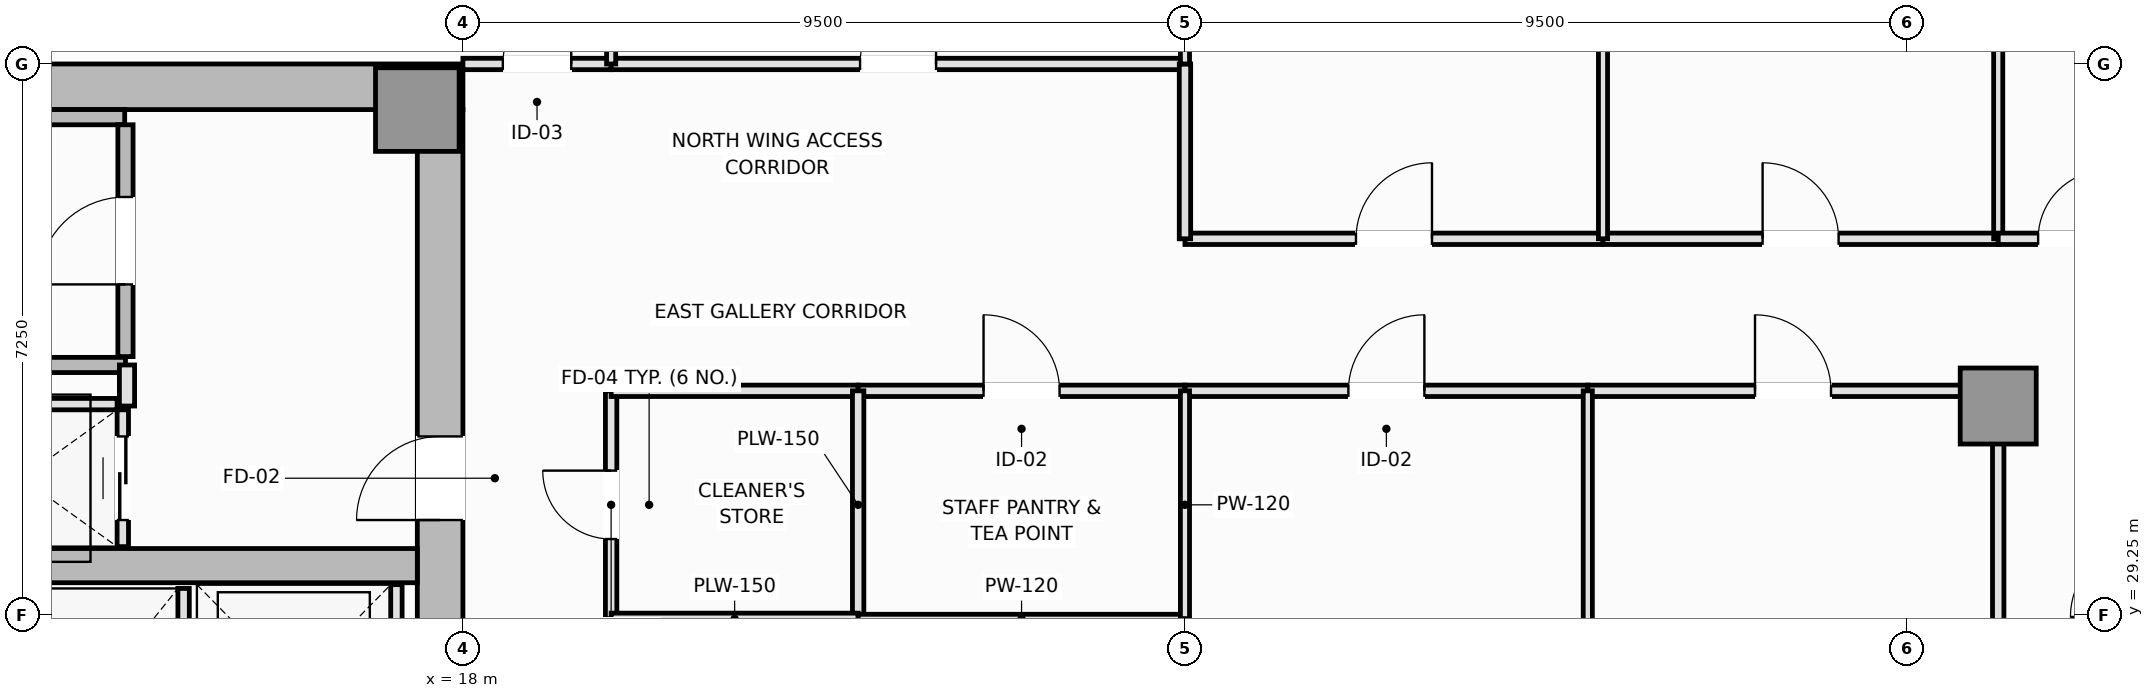
"""IFC4 building model, lengths in metres.
Left out: names, types, materials, properties, quantities, classifications, styles, units other than length and angle.
Written with IfcOpenShell. Run it as: python <this file> out.ifc"""

import sys

from ifc_helpers import new_model, si_unit, direction, frame, frame_2d, origin, origin_2d, place, context, subcontext, project, spatial, rectangle, extrude, element, fill, save


model = new_model("IFC4")
c1 = context("Model", 3, precision=1e-05, world=origin(), true_north=direction((0.0, 1.0)))
c2 = subcontext(c1, "Body", "Model", "MODEL_VIEW")
j1 = project(units=[si_unit("LENGTHUNIT", "METRE"), si_unit("PLANEANGLEUNIT", "RADIAN")], contexts=[c1])
p1 = place(None, origin())
s1 = spatial("IfcSite", under=j1, at=p1, CompositionType="ELEMENT")
p2 = place(p1, origin())
s2 = spatial("IfcBuilding", under=s1, at=p2, CompositionType="ELEMENT")
p3 = place(p2, frame((0.0, 0.0, 116.45)))
s3 = spatial("IfcBuildingStorey", under=s2, at=p3, CompositionType="ELEMENT", Elevation=116.45)
p4 = place(p3, frame((4.5, 36.2, 0.0), z_axis=(0.0, 0.0, 1.0), x_axis=(1.0, 0.0, 0.0)))
e1 = element("IfcWall", 1, at=p4, inside=s3, PredefinedType="SHEAR", context=c2, shape_type="SweptSolid", body=[
    extrude(rectangle(XDim=13.5, YDim=0.6, at=frame_2d((6.75, 0.0))), origin(), (0.0, 0.0, 1.0), 3.55),
])
p5 = place(p3, frame((17.7, 27.05, 0.0), z_axis=(0.0, 0.0, 1.0), x_axis=(0.0, 1.0, 0.0)))
e2 = element("IfcWall", 2, at=p5, inside=s3, PredefinedType="SHEAR", context=c2, shape_type="SweptSolid", body=[
    extrude(rectangle(XDim=8.85, YDim=0.6, at=frame_2d((4.425, 0.0))), origin(), (0.0, 0.0, 1.0), 3.55),
])
p6 = place(p5, frame((3.45, 0.0, 0.0)))
e3 = element("IfcOpeningElement", 3, at=p6, cuts=e2, PredefinedType="OPENING", context=c2, shape_type="SweptSolid", body=[
    extrude(rectangle(XDim=1.1, YDim=2.15, at=frame_2d((0.55, 1.075))), frame((0.0, 0.31, 0.0), z_axis=(0.0, -1.0, 0.0), x_axis=(1.0, 0.0, 0.0)), (0.0, 0.0, 1.0), 0.62),
])
p7 = place(p3, frame((5.1, 29.9, 0.0), z_axis=(0.0, 0.0, 1.0), x_axis=(1.0, 0.0, 0.0)))
e4 = element("IfcWall", 4, at=p7, inside=s3, PredefinedType="SHEAR", context=c2, shape_type="SweptSolid", body=[
    extrude(rectangle(XDim=12.3, YDim=0.45, at=frame_2d((6.15, 0.0))), origin(), (0.0, 0.0, 1.0), 3.55),
])
p8 = place(p3, frame((17.4, 35.9, 0.0), z_axis=(0.0, 0.0, 1.0), x_axis=(1.0, 0.0, 0.0)))
e5 = element("IfcColumn", 5, at=p8, inside=s3, PredefinedType="PILASTER", context=c2, shape_type="SweptSolid", body=[
    extrude(rectangle(XDim=1.1, YDim=1.1, at=origin_2d()), origin(), (0.0, 0.0, 1.0), 3.55),
])
p9 = place(p3, frame((38.2, 32.0, 0.0), z_axis=(0.0, 0.0, 1.0), x_axis=(1.0, 0.0, 0.0)))
e6 = element("IfcColumn", 6, at=p9, inside=s3, PredefinedType="COLUMN", context=c2, shape_type="SweptSolid", body=[
    extrude(rectangle(XDim=1.0, YDim=1.0, at=origin_2d()), origin(), (0.0, 0.0, 1.0), 3.55),
])
p10 = place(p3, frame((5.8, 35.8, 0.0), z_axis=(0.0, 0.0, 1.0), x_axis=(1.0, 0.0, 0.0)))
e7 = element("IfcWall", 7, at=p10, inside=s3, PredefinedType="SOLIDWALL", context=c2, shape_type="SweptSolid", body=[
    extrude(rectangle(XDim=7.75, YDim=0.2, at=frame_2d((3.875, 0.0))), origin(), (0.0, 0.0, 1.0), 3.55),
])
p11 = place(p3, frame((5.9, 32.54, 0.0), z_axis=(0.0, 0.0, 1.0), x_axis=(1.0, 0.0, 0.0)))
e8 = element("IfcWall", 8, at=p11, inside=s3, PredefinedType="SOLIDWALL", context=c2, shape_type="SweptSolid", body=[
    extrude(rectangle(XDim=7.66, YDim=0.2, at=frame_2d((3.83, 0.0))), origin(), (0.0, 0.0, 1.0), 3.55),
])
p12 = place(p3, frame((13.56, 32.65, 0.0), z_axis=(0.0, 0.0, 1.0), x_axis=(0.0, 1.0, 0.0)))
e9 = element("IfcWall", 9, at=p12, inside=s3, PredefinedType="SOLIDWALL", context=c2, shape_type="SweptSolid", body=[
    extrude(rectangle(XDim=3.05, YDim=0.2, at=frame_2d((1.525, 0.0))), origin(), (0.0, 0.0, 1.0), 3.55),
])
p13 = place(p12, frame((0.95, 0.0, 0.0)))
e10 = element("IfcOpeningElement", 10, at=p13, cuts=e9, PredefinedType="OPENING", context=c2, shape_type="SweptSolid", body=[
    extrude(rectangle(XDim=1.15, YDim=2.15, at=frame_2d((0.575, 1.075))), frame((0.0, 0.11, 0.0), z_axis=(0.0, -1.0, 0.0), x_axis=(1.0, 0.0, 0.0)), (0.0, 0.0, 1.0), 0.22),
])
p14 = place(p3, frame((14.325, 27.05, 0.0), z_axis=(0.0, 0.0, 1.0), x_axis=(0.0, 1.0, 0.0)))
e11 = element("IfcWall", 11, at=p14, inside=s3, PredefinedType="PARTITIONING", context=c2, shape_type="SweptSolid", body=[
    extrude(rectangle(XDim=2.55, YDim=0.15, at=frame_2d((1.275, 0.0))), origin(), (0.0, 0.0, 1.0), 3.37),
])
p15 = place(p3, frame((17.125, 27.05, 0.0), z_axis=(0.0, 0.0, 1.0), x_axis=(0.0, 1.0, 0.0)))
e12 = element("IfcWall", 12, at=p15, inside=s3, PredefinedType="PARTITIONING", context=c2, shape_type="SweptSolid", body=[
    extrude(rectangle(XDim=2.6, YDim=0.15, at=frame_2d((1.3, 0.0))), origin(), (0.0, 0.0, 1.0), 3.37),
])
p16 = place(p3, frame((10.95, 32.025, 0.0), z_axis=(0.0, 0.0, 1.0), x_axis=(1.0, 0.0, 0.0)))
e13 = element("IfcWall", 13, at=p16, inside=s3, PredefinedType="PARTITIONING", context=c2, shape_type="SweptSolid", body=[
    extrude(rectangle(XDim=2.5, YDim=0.15, at=frame_2d((1.25, 0.0))), origin(), (0.0, 0.0, 1.0), 3.37),
])
p17 = place(p3, frame((13.525, 30.15, 0.0), z_axis=(0.0, 0.0, 1.0), x_axis=(0.0, 1.0, 0.0)))
e14 = element("IfcWall", 14, at=p17, inside=s3, PredefinedType="PARTITIONING", context=c2, shape_type="SweptSolid", body=[
    extrude(rectangle(XDim=1.8, YDim=0.15, at=frame_2d((0.9, 0.0))), origin(), (0.0, 0.0, 1.0), 3.37),
])
p18 = place(p17, frame((0.35, 0.0, 0.0)))
e15 = element("IfcOpeningElement", 15, at=p18, cuts=e14, PredefinedType="OPENING", context=c2, shape_type="SweptSolid", body=[
    extrude(rectangle(XDim=1.1, YDim=2.2, at=frame_2d((0.55, 1.1))), frame((0.0, 0.085, 0.0), z_axis=(0.0, -1.0, 0.0), x_axis=(1.0, 0.0, 0.0)), (0.0, 0.0, 1.0), 0.17),
])
p19 = place(p3, frame((13.58, 32.0, 0.0), z_axis=(0.0, 0.0, 1.0), x_axis=(0.0, 1.0, 0.0)))
e16 = element("IfcWall", 16, at=p19, inside=s3, PredefinedType="PARTITIONING", context=c2, shape_type="SweptSolid", body=[
    extrude(rectangle(XDim=0.54, YDim=0.2, at=frame_2d((0.27, 0.0))), origin(), (0.0, 0.0, 1.0), 3.37),
])
p20 = place(p3, frame((19.95, 29.2, 0.0), z_axis=(0.0, 0.0, 1.0), x_axis=(0.0, 1.0, 0.0)))
e17 = element("IfcWall", 17, at=p20, inside=s3, PredefinedType="PLUMBINGWALL", context=c2, shape_type="SweptSolid", body=[
    extrude(rectangle(XDim=3.0, YDim=0.15, at=frame_2d((1.5, 0.0))), origin(), (0.0, 0.0, 1.0), 3.37),
])
p21 = place(p20, frame((1.05, 0.0, 0.0)))
e18 = element("IfcOpeningElement", 18, at=p21, cuts=e17, PredefinedType="OPENING", context=c2, shape_type="SweptSolid", body=[
    extrude(rectangle(XDim=0.9, YDim=2.1, at=frame_2d((0.45, 1.05))), frame((0.0, 0.085, 0.0), z_axis=(0.0, -1.0, 0.0), x_axis=(1.0, 0.0, 0.0)), (0.0, 0.0, 1.0), 0.17),
])
p22 = place(p3, frame((18.0, 36.5, 0.0), z_axis=(0.0, 0.0, 1.0), x_axis=(1.0, 0.0, 0.0)))
e19 = element("IfcWall", 19, at=p22, inside=s3, PredefinedType="PARTITIONING", context=c2, shape_type="SweptSolid", body=[
    extrude(rectangle(XDim=1.95, YDim=0.15, at=frame_2d((0.975, 0.0))), origin(), (0.0, 0.0, 1.0), 3.37),
])
p23 = place(p22, frame((0.525, 0.0, 0.0)))
e20 = element("IfcOpeningElement", 20, at=p23, cuts=e19, PredefinedType="OPENING", context=c2, shape_type="SweptSolid", body=[
    extrude(rectangle(XDim=0.9, YDim=2.1, at=frame_2d((0.45, 1.05))), frame((0.0, 0.085, 0.0), z_axis=(0.0, -1.0, 0.0), x_axis=(1.0, 0.0, 0.0)), (0.0, 0.0, 1.0), 0.17),
])
p24 = place(p3, frame((19.95, 32.2, 0.0), z_axis=(0.0, 0.0, 1.0), x_axis=(1.0, 0.0, 0.0)))
e21 = element("IfcWall", 21, at=p24, inside=s3, PredefinedType="PLUMBINGWALL", context=c2, shape_type="SweptSolid", body=[
    extrude(rectangle(XDim=3.25, YDim=0.15, at=frame_2d((1.625, 0.0))), origin(), (0.0, 0.0, 1.0), 3.37),
])
p25 = place(p3, frame((23.2, 32.2, 0.0), z_axis=(0.0, 0.0, 1.0), x_axis=(1.0, 0.0, 0.0)))
e22 = element("IfcWall", 22, at=p25, inside=s3, PredefinedType="PARTITIONING", context=c2, shape_type="SweptSolid", body=[
    extrude(rectangle(XDim=4.3, YDim=0.15, at=frame_2d((2.15, 0.0))), origin(), (0.0, 0.0, 1.0), 3.37),
])
p26 = place(p25, frame((1.65, 0.0, 0.0)))
e23 = element("IfcOpeningElement", 23, at=p26, cuts=e22, PredefinedType="OPENING", context=c2, shape_type="SweptSolid", body=[
    extrude(rectangle(XDim=1.0, YDim=2.15, at=frame_2d((0.5, 1.075))), frame((0.0, 0.085, 0.0), z_axis=(0.0, -1.0, 0.0), x_axis=(1.0, 0.0, 0.0)), (0.0, 0.0, 1.0), 0.17),
])
p27 = place(p3, frame((27.5, 32.2, 0.0), z_axis=(0.0, 0.0, 1.0), x_axis=(1.0, 0.0, 0.0)))
e24 = element("IfcWall", 24, at=p27, inside=s3, PredefinedType="PARTITIONING", context=c2, shape_type="SweptSolid", body=[
    extrude(rectangle(XDim=5.3, YDim=0.15, at=frame_2d((2.65, 0.0))), origin(), (0.0, 0.0, 1.0), 3.37),
])
p28 = place(p27, frame((2.15, 0.0, 0.0)))
e25 = element("IfcOpeningElement", 25, at=p28, cuts=e24, PredefinedType="OPENING", context=c2, shape_type="SweptSolid", body=[
    extrude(rectangle(XDim=1.0, YDim=2.15, at=frame_2d((0.5, 1.075))), frame((0.0, 0.085, 0.0), z_axis=(0.0, -1.0, 0.0), x_axis=(1.0, 0.0, 0.0)), (0.0, 0.0, 1.0), 0.17),
])
p29 = place(p3, frame((32.8, 32.2, 0.0), z_axis=(0.0, 0.0, 1.0), x_axis=(1.0, 0.0, 0.0)))
e26 = element("IfcWall", 26, at=p29, inside=s3, PredefinedType="PARTITIONING", context=c2, shape_type="SweptSolid", body=[
    extrude(rectangle(XDim=5.4, YDim=0.15, at=frame_2d((2.7, 0.0))), origin(), (0.0, 0.0, 1.0), 3.37),
])
p30 = place(p29, frame((2.2, 0.0, 0.0)))
e27 = element("IfcOpeningElement", 27, at=p30, cuts=e26, PredefinedType="OPENING", context=c2, shape_type="SweptSolid", body=[
    extrude(rectangle(XDim=1.0, YDim=2.15, at=frame_2d((0.5, 1.075))), frame((0.0, 0.085, 0.0), z_axis=(0.0, -1.0, 0.0), x_axis=(1.0, 0.0, 0.0)), (0.0, 0.0, 1.0), 0.17),
])
p31 = place(p3, frame((27.5, 34.2, 0.0), z_axis=(0.0, 0.0, 1.0), x_axis=(1.0, 0.0, 0.0)))
e28 = element("IfcWall", 28, at=p31, inside=s3, PredefinedType="PARTITIONING", context=c2, shape_type="SweptSolid", body=[
    extrude(rectangle(XDim=5.5, YDim=0.15, at=frame_2d((2.75, 0.0))), origin(), (0.0, 0.0, 1.0), 3.37),
])
p32 = place(p31, frame((2.25, 0.0, 0.0)))
e29 = element("IfcOpeningElement", 29, at=p32, cuts=e28, PredefinedType="OPENING", context=c2, shape_type="SweptSolid", body=[
    extrude(rectangle(XDim=1.0, YDim=2.15, at=frame_2d((0.5, 1.075))), frame((0.0, 0.085, 0.0), z_axis=(0.0, -1.0, 0.0), x_axis=(1.0, 0.0, 0.0)), (0.0, 0.0, 1.0), 0.17),
])
p33 = place(p3, frame((33.0, 34.2, 0.0), z_axis=(0.0, 0.0, 1.0), x_axis=(1.0, 0.0, 0.0)))
e30 = element("IfcWall", 30, at=p33, inside=s3, PredefinedType="PARTITIONING", context=c2, shape_type="SweptSolid", body=[
    extrude(rectangle(XDim=5.2, YDim=0.15, at=frame_2d((2.6, 0.0))), origin(), (0.0, 0.0, 1.0), 3.37),
])
p34 = place(p33, frame((2.1, 0.0, 0.0)))
e31 = element("IfcOpeningElement", 31, at=p34, cuts=e30, PredefinedType="OPENING", context=c2, shape_type="SweptSolid", body=[
    extrude(rectangle(XDim=1.0, YDim=2.15, at=frame_2d((0.5, 1.075))), frame((0.0, 0.085, 0.0), z_axis=(0.0, -1.0, 0.0), x_axis=(1.0, 0.0, 0.0)), (0.0, 0.0, 1.0), 0.17),
])
p35 = place(p3, frame((19.95, 36.5, 0.0), z_axis=(0.0, 0.0, 1.0), x_axis=(1.0, 0.0, 0.0)))
e32 = element("IfcWall", 32, at=p35, inside=s3, PredefinedType="PARTITIONING", context=c2, shape_type="SweptSolid", body=[
    extrude(rectangle(XDim=7.55, YDim=0.15, at=frame_2d((3.775, 0.0))), origin(), (0.0, 0.0, 1.0), 3.37),
])
p36 = place(p35, frame((3.275, 0.0, 0.0)))
e33 = element("IfcOpeningElement", 33, at=p36, cuts=e32, PredefinedType="OPENING", context=c2, shape_type="SweptSolid", body=[
    extrude(rectangle(XDim=1.0, YDim=2.15, at=frame_2d((0.5, 1.075))), frame((0.0, 0.085, 0.0), z_axis=(0.0, -1.0, 0.0), x_axis=(1.0, 0.0, 0.0)), (0.0, 0.0, 1.0), 0.17),
])
p37 = place(p3, frame((27.5, 34.2, 0.0), z_axis=(0.0, 0.0, 1.0), x_axis=(0.0, 1.0, 0.0)))
e34 = element("IfcWall", 34, at=p37, inside=s3, PredefinedType="PARTITIONING", context=c2, shape_type="SweptSolid", body=[
    extrude(rectangle(XDim=2.3, YDim=0.15, at=frame_2d((1.15, 0.0))), origin(), (0.0, 0.0, 1.0), 3.37),
])
p38 = place(p3, frame((23.2, 29.2, 0.0), z_axis=(0.0, 0.0, 1.0), x_axis=(0.0, 1.0, 0.0)))
e35 = element("IfcWall", 35, at=p38, inside=s3, PredefinedType="PLUMBINGWALL", context=c2, shape_type="SweptSolid", body=[
    extrude(rectangle(XDim=3.0, YDim=0.15, at=frame_2d((1.5, 0.0))), origin(), (0.0, 0.0, 1.0), 3.37),
])
p39 = place(p3, frame((19.95, 29.2, 0.0), z_axis=(0.0, 0.0, 1.0), x_axis=(1.0, 0.0, 0.0)))
e36 = element("IfcWall", 36, at=p39, inside=s3, PredefinedType="PLUMBINGWALL", context=c2, shape_type="SweptSolid", body=[
    extrude(rectangle(XDim=3.25, YDim=0.15, at=frame_2d((1.625, 0.0))), origin(), (0.0, 0.0, 1.0), 3.37),
])
p40 = place(p3, frame((23.2, 29.2, 0.0), z_axis=(0.0, 0.0, 1.0), x_axis=(1.0, 0.0, 0.0)))
e37 = element("IfcWall", 37, at=p40, inside=s3, PredefinedType="PARTITIONING", context=c2, shape_type="SweptSolid", body=[
    extrude(rectangle(XDim=4.3, YDim=0.12, at=frame_2d((2.15, 0.0))), origin(), (0.0, 0.0, 1.0), 3.37),
])
p41 = place(p3, frame((27.5, 29.2, 0.0), z_axis=(0.0, 0.0, 1.0), x_axis=(0.0, 1.0, 0.0)))
e38 = element("IfcWall", 38, at=p41, inside=s3, PredefinedType="PARTITIONING", context=c2, shape_type="SweptSolid", body=[
    extrude(rectangle(XDim=3.0, YDim=0.12, at=frame_2d((1.5, 0.0))), origin(), (0.0, 0.0, 1.0), 3.37),
])
p42 = place(p3, frame((32.8, 3.51, 0.0), z_axis=(0.0, 0.0, 1.0), x_axis=(0.0, 1.0, 0.0)))
e39 = element("IfcWall", 39, at=p42, inside=s3, PredefinedType="PARTITIONING", context=c2, shape_type="SweptSolid", body=[
    extrude(rectangle(XDim=28.69, YDim=0.12, at=frame_2d((14.345, 0.0))), origin(), (0.0, 0.0, 1.0), 3.37),
])
p43 = place(p3, frame((38.2, 20.5, 0.0), z_axis=(0.0, 0.0, 1.0), x_axis=(0.0, 1.0, 0.0)))
e40 = element("IfcWall", 40, at=p43, inside=s3, PredefinedType="PARTITIONING", context=c2, shape_type="SweptSolid", body=[
    extrude(rectangle(XDim=11.7, YDim=0.15, at=frame_2d((5.85, 0.0))), origin(), (0.0, 0.0, 1.0), 2.87),
])
p44 = place(p3, frame((19.95, 36.5, 0.0), z_axis=(0.0, 0.0, 1.0), x_axis=(0.0, 1.0, 0.0)))
e41 = element("IfcWall", 41, at=p44, inside=s3, PredefinedType="PARTITIONING", context=c2, shape_type="SweptSolid", body=[
    extrude(rectangle(XDim=9.99, YDim=0.12, at=frame_2d((4.995, 0.0))), origin(), (0.0, 0.0, 1.0), 3.37),
])
p45 = place(p3, frame((27.5, 36.5, 0.0), z_axis=(0.0, 0.0, 1.0), x_axis=(0.0, 1.0, 0.0)))
e42 = element("IfcWall", 42, at=p45, inside=s3, PredefinedType="PARTITIONING", context=c2, shape_type="SweptSolid", body=[
    extrude(rectangle(XDim=9.99, YDim=0.12, at=frame_2d((4.995, 0.0))), origin(), (0.0, 0.0, 1.0), 2.87),
])
p46 = place(p3, frame((33.0, 34.2, 0.0), z_axis=(0.0, 0.0, 1.0), x_axis=(0.0, 1.0, 0.0)))
e43 = element("IfcWall", 43, at=p46, inside=s3, PredefinedType="PARTITIONING", context=c2, shape_type="SweptSolid", body=[
    extrude(rectangle(XDim=12.29, YDim=0.12, at=frame_2d((6.145, 0.0))), origin(), (0.0, 0.0, 1.0), 3.37),
])
p47 = place(p3, frame((38.2, 34.2, 0.0), z_axis=(0.0, 0.0, 1.0), x_axis=(0.0, 1.0, 0.0)))
e44 = element("IfcWall", 44, at=p47, inside=s3, PredefinedType="PARTITIONING", context=c2, shape_type="SweptSolid", body=[
    extrude(rectangle(XDim=12.29, YDim=0.12, at=frame_2d((6.145, 0.0))), origin(), (0.0, 0.0, 1.0), 2.87),
])
p48 = place(p3, frame((38.2, 34.2, 0.0), z_axis=(0.0, 0.0, 1.0), x_axis=(1.0, 0.0, 0.0)))
e45 = element("IfcWall", 45, at=p48, inside=s3, PredefinedType="PARTITIONING", context=c2, shape_type="SweptSolid", body=[
    extrude(rectangle(XDim=1.95, YDim=0.15, at=frame_2d((0.975, 0.0))), origin(), (0.0, 0.0, 1.0), 3.37),
])
p49 = place(p48, frame((0.525, 0.0, 0.0)))
e46 = element("IfcOpeningElement", 46, at=p49, cuts=e45, PredefinedType="OPENING", context=c2, shape_type="SweptSolid", body=[
    extrude(rectangle(XDim=0.9, YDim=2.1, at=frame_2d((0.45, 1.05))), frame((0.0, 0.085, 0.0), z_axis=(0.0, -1.0, 0.0), x_axis=(1.0, 0.0, 0.0)), (0.0, 0.0, 1.0), 0.17),
])
p50 = place(p13, origin())
e47 = element("IfcDoor", 47, at=p50, inside=s3, OperationType="SINGLE_SWING_LEFT", PredefinedType="DOOR", context=c2, shape_type="SweptSolid", body=[
    extrude(rectangle(XDim=1.15, YDim=2.15, at=frame_2d((0.575, 1.075))), frame((0.0, 0.025, 0.0), z_axis=(0.0, -1.0, 0.0), x_axis=(1.0, 0.0, 0.0)), (0.0, 0.0, 1.0), 0.05),
])
fill(e10, e47)
p51 = place(p18, origin())
e48 = element("IfcDoor", 48, at=p51, inside=s3, OperationType="DOUBLE_DOOR_SLIDING", PredefinedType="DOOR", context=c2, shape_type="SweptSolid", body=[
    extrude(rectangle(XDim=1.1, YDim=2.2, at=frame_2d((0.55, 1.1))), frame((0.0, 0.025, 0.0), z_axis=(0.0, -1.0, 0.0), x_axis=(1.0, 0.0, 0.0)), (0.0, 0.0, 1.0), 0.05),
])
fill(e15, e48)
p52 = place(p6, origin())
e49 = element("IfcDoor", 49, at=p52, inside=s3, OperationType="SINGLE_SWING_LEFT", PredefinedType="DOOR", context=c2, shape_type="SweptSolid", body=[
    extrude(rectangle(XDim=1.1, YDim=2.15, at=frame_2d((0.55, 1.075))), frame((0.0, 0.025, 0.0), z_axis=(0.0, -1.0, 0.0), x_axis=(1.0, 0.0, 0.0)), (0.0, 0.0, 1.0), 0.05),
])
fill(e3, e49)
p53 = place(p21, origin())
e50 = element("IfcDoor", 50, at=p53, inside=s3, OperationType="SINGLE_SWING_RIGHT", PredefinedType="DOOR", context=c2, shape_type="SweptSolid", body=[
    extrude(rectangle(XDim=0.9, YDim=2.1, at=frame_2d((0.45, 1.05))), frame((0.0, 0.025, 0.0), z_axis=(0.0, -1.0, 0.0), x_axis=(1.0, 0.0, 0.0)), (0.0, 0.0, 1.0), 0.05),
])
fill(e18, e50)
p54 = place(p23, origin())
e51 = element("IfcDoor", 51, at=p54, inside=s3, OperationType="SINGLE_SWING_RIGHT", PredefinedType="DOOR", context=c2, shape_type="SweptSolid", body=[
    extrude(rectangle(XDim=0.9, YDim=2.1, at=frame_2d((0.45, 1.05))), frame((0.0, 0.025, 0.0), z_axis=(0.0, -1.0, 0.0), x_axis=(1.0, 0.0, 0.0)), (0.0, 0.0, 1.0), 0.05),
])
fill(e20, e51)
p55 = place(p26, origin())
e52 = element("IfcDoor", 52, at=p55, inside=s3, OperationType="SINGLE_SWING_LEFT", PredefinedType="DOOR", context=c2, shape_type="SweptSolid", body=[
    extrude(rectangle(XDim=1.0, YDim=2.15, at=frame_2d((0.5, 1.075))), frame((0.0, 0.025, 0.0), z_axis=(0.0, -1.0, 0.0), x_axis=(1.0, 0.0, 0.0)), (0.0, 0.0, 1.0), 0.05),
])
fill(e23, e52)
p56 = place(p28, origin())
e53 = element("IfcDoor", 53, at=p56, inside=s3, OperationType="SINGLE_SWING_RIGHT", PredefinedType="DOOR", context=c2, shape_type="SweptSolid", body=[
    extrude(rectangle(XDim=1.0, YDim=2.15, at=frame_2d((0.5, 1.075))), frame((0.0, 0.025, 0.0), z_axis=(0.0, -1.0, 0.0), x_axis=(1.0, 0.0, 0.0)), (0.0, 0.0, 1.0), 0.05),
])
fill(e25, e53)
p57 = place(p30, origin())
e54 = element("IfcDoor", 54, at=p57, inside=s3, OperationType="SINGLE_SWING_LEFT", PredefinedType="DOOR", context=c2, shape_type="SweptSolid", body=[
    extrude(rectangle(XDim=1.0, YDim=2.15, at=frame_2d((0.5, 1.075))), frame((0.0, 0.025, 0.0), z_axis=(0.0, -1.0, 0.0), x_axis=(1.0, 0.0, 0.0)), (0.0, 0.0, 1.0), 0.05),
])
fill(e27, e54)
p58 = place(p32, origin())
e55 = element("IfcDoor", 55, at=p58, inside=s3, OperationType="SINGLE_SWING_RIGHT", PredefinedType="DOOR", context=c2, shape_type="SweptSolid", body=[
    extrude(rectangle(XDim=1.0, YDim=2.15, at=frame_2d((0.5, 1.075))), frame((0.0, 0.025, 0.0), z_axis=(0.0, -1.0, 0.0), x_axis=(1.0, 0.0, 0.0)), (0.0, 0.0, 1.0), 0.05),
])
fill(e29, e55)
p59 = place(p34, origin())
e56 = element("IfcDoor", 56, at=p59, inside=s3, OperationType="SINGLE_SWING_LEFT", PredefinedType="DOOR", context=c2, shape_type="SweptSolid", body=[
    extrude(rectangle(XDim=1.0, YDim=2.15, at=frame_2d((0.5, 1.075))), frame((0.0, 0.025, 0.0), z_axis=(0.0, -1.0, 0.0), x_axis=(1.0, 0.0, 0.0)), (0.0, 0.0, 1.0), 0.05),
])
fill(e31, e56)
p60 = place(p36, origin())
e57 = element("IfcDoor", 57, at=p60, inside=s3, OperationType="SINGLE_SWING_RIGHT", PredefinedType="DOOR", context=c2, shape_type="SweptSolid", body=[
    extrude(rectangle(XDim=1.0, YDim=2.15, at=frame_2d((0.5, 1.075))), frame((0.0, 0.025, 0.0), z_axis=(0.0, -1.0, 0.0), x_axis=(1.0, 0.0, 0.0)), (0.0, 0.0, 1.0), 0.05),
])
fill(e33, e57)
p61 = place(p49, origin())
e58 = element("IfcDoor", 58, at=p61, inside=s3, OperationType="SINGLE_SWING_RIGHT", PredefinedType="DOOR", context=c2, shape_type="SweptSolid", body=[
    extrude(rectangle(XDim=0.9, YDim=2.1, at=frame_2d((0.45, 1.05))), frame((0.0, 0.025, 0.0), z_axis=(0.0, -1.0, 0.0), x_axis=(1.0, 0.0, 0.0)), (0.0, 0.0, 1.0), 0.05),
])
fill(e46, e58)
save(model, sys.argv[1])
